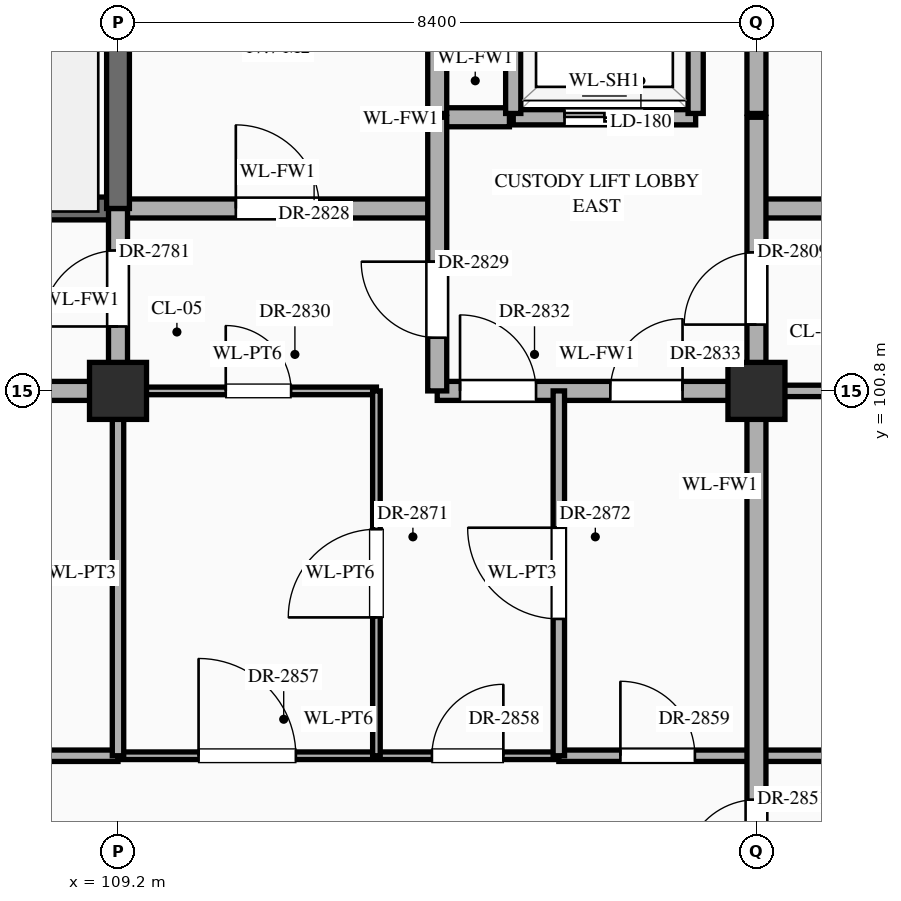
"""IFC4 building model, lengths in metres.
Left out: names, types, materials, properties, quantities, classifications, styles, units other than length and angle.
Written with IfcOpenShell. Run it as: python <this file> out.ifc"""

import sys

from ifc_helpers import new_model, si_unit, direction, frame, frame_2d, origin, origin_2d, place, context, subcontext, project, spatial, rectangle, extrude, element, fill, save


model = new_model("IFC4")
c1 = context("Model", 3, precision=1e-05, world=origin(), true_north=direction((0.0, 1.0)))
c2 = subcontext(c1, "Body", "Model", "MODEL_VIEW")
j1 = project(units=[si_unit("LENGTHUNIT", "METRE"), si_unit("PLANEANGLEUNIT", "RADIAN")], contexts=[c1])
p1 = place(None, origin())
s1 = spatial("IfcSite", under=j1, at=p1, CompositionType="ELEMENT")
p2 = place(p1, origin())
s2 = spatial("IfcBuilding", under=s1, at=p2, CompositionType="ELEMENT")
p3 = place(p2, frame((0.0, 0.0, 43.5)))
s3 = spatial("IfcBuildingStorey", under=s2, at=p3, CompositionType="ELEMENT", Elevation=43.5)
for number, where, z_axis, x_axis in (
    (1, (109.2, 100.8, 0.0), (0.0, 0.0, 1.0), (1.0, 0.0, 0.0)),
    (2, (117.6, 100.8, 0.0), (0.0, 0.0, 1.0), (1.0, 0.0, 0.0)),
):
    element("IfcColumn", number, at=place(p3, frame(where, z_axis=z_axis, x_axis=x_axis)), inside=s3, PredefinedType="COLUMN", context=c2, shape_type="SweptSolid", body=[
        extrude(rectangle(XDim=0.75, YDim=0.75, at=origin_2d()), origin(), (0.0, 0.0, 1.0), 4.2),
    ])
p4 = place(p3, frame((89.8, 96.0, 0.0), z_axis=(0.0, 0.0, 1.0), x_axis=(1.0, 0.0, 0.0)))
e3 = element("IfcWall", 3, at=p4, inside=s3, PredefinedType="STANDARD", context=c2, shape_type="SweptSolid", body=[
    extrude(rectangle(XDim=19.4, YDim=0.15, at=frame_2d((9.7, 0.0))), origin(), (0.0, 0.0, 1.0), 3.95),
])
p5 = place(p4, frame((0.72, 0.0, 0.0)))
e4 = element("IfcOpeningElement", 4, at=p5, cuts=e3, PredefinedType="OPENING", context=c2, shape_type="SweptSolid", body=[
    extrude(rectangle(XDim=1.16, YDim=2.3, at=frame_2d((0.58, 1.15))), frame((0.0, 0.087, 0.0), z_axis=(0.0, -1.0, 0.0), x_axis=(1.0, 0.0, 0.0)), (0.0, 0.0, 1.0), 0.174),
])
p6 = place(p4, frame((6.2, 0.0, 0.0)))
e5 = element("IfcOpeningElement", 5, at=p6, cuts=e3, PredefinedType="OPENING", context=c2, shape_type="SweptSolid", body=[
    extrude(rectangle(XDim=1.2, YDim=2.35, at=frame_2d((0.6, 1.175))), frame((0.0, 0.087, 0.0), z_axis=(0.0, -1.0, 0.0), x_axis=(1.0, 0.0, 0.0)), (0.0, 0.0, 1.0), 0.174),
])
p7 = place(p4, frame((14.58, 0.0, 0.0)))
e6 = element("IfcOpeningElement", 6, at=p7, cuts=e3, PredefinedType="OPENING", context=c2, shape_type="SweptSolid", body=[
    extrude(rectangle(XDim=1.24, YDim=2.3, at=frame_2d((0.62, 1.15))), frame((0.0, 0.087, 0.0), z_axis=(0.0, -1.0, 0.0), x_axis=(1.0, 0.0, 0.0)), (0.0, 0.0, 1.0), 0.174),
])
p8 = place(p3, frame((109.2, 96.0, 0.0), z_axis=(0.0, 0.0, 1.0), x_axis=(1.0, 0.0, 0.0)))
e7 = element("IfcWall", 7, at=p8, inside=s3, PredefinedType="STANDARD", context=c2, shape_type="SweptSolid", body=[
    extrude(rectangle(XDim=5.8, YDim=0.1, at=frame_2d((2.9, 0.0))), origin(), (0.0, 0.0, 1.0), 3.95),
])
p9 = place(p8, frame((1.06, 0.0, 0.0)))
e8 = element("IfcOpeningElement", 8, at=p9, cuts=e7, PredefinedType="OPENING", context=c2, shape_type="SweptSolid", body=[
    extrude(rectangle(XDim=1.28, YDim=2.35, at=frame_2d((0.64, 1.175))), frame((0.0, 0.062, 0.0), z_axis=(0.0, -1.0, 0.0), x_axis=(1.0, 0.0, 0.0)), (0.0, 0.0, 1.0), 0.124),
])
p10 = place(p8, frame((4.13, 0.0, 0.0)))
e9 = element("IfcOpeningElement", 9, at=p10, cuts=e7, PredefinedType="OPENING", context=c2, shape_type="SweptSolid", body=[
    extrude(rectangle(XDim=0.94, YDim=2.3, at=frame_2d((0.47, 1.15))), frame((0.0, 0.062, 0.0), z_axis=(0.0, -1.0, 0.0), x_axis=(1.0, 0.0, 0.0)), (0.0, 0.0, 1.0), 0.124),
])
p11 = place(p3, frame((115.0, 96.0, 0.0), z_axis=(0.0, 0.0, 1.0), x_axis=(1.0, 0.0, 0.0)))
e10 = element("IfcWall", 10, at=p11, inside=s3, PredefinedType="STANDARD", context=c2, shape_type="SweptSolid", body=[
    extrude(rectangle(XDim=10.96, YDim=0.15, at=frame_2d((5.48, 0.0))), origin(), (0.0, 0.0, 1.0), 4.0),
])
p12 = place(p11, frame((0.81, 0.0, 0.0)))
e11 = element("IfcOpeningElement", 11, at=p12, cuts=e10, PredefinedType="OPENING", context=c2, shape_type="SweptSolid", body=[
    extrude(rectangle(XDim=0.98, YDim=2.35, at=frame_2d((0.49, 1.175))), frame((0.0, 0.087, 0.0), z_axis=(0.0, -1.0, 0.0), x_axis=(1.0, 0.0, 0.0)), (0.0, 0.0, 1.0), 0.174),
])
p13 = place(p11, frame((6.3, 0.0, 0.0)))
e12 = element("IfcOpeningElement", 12, at=p13, cuts=e10, PredefinedType="OPENING", context=c2, shape_type="SweptSolid", body=[
    extrude(rectangle(XDim=0.96, YDim=2.2, at=frame_2d((0.48, 1.1))), frame((0.0, 0.087, 0.0), z_axis=(0.0, -1.0, 0.0), x_axis=(1.0, 0.0, 0.0)), (0.0, 0.0, 1.0), 0.174),
])
p14 = place(p3, frame((96.6, 100.8, 0.0), z_axis=(0.0, 0.0, 1.0), x_axis=(1.0, 0.0, 0.0)))
e13 = element("IfcWall", 13, at=p14, inside=s3, PredefinedType="STANDARD", context=c2, shape_type="SweptSolid", body=[
    extrude(rectangle(XDim=12.6, YDim=0.25, at=frame_2d((6.3, 0.0))), origin(), (0.0, 0.0, 1.0), 3.1),
])
p15 = place(p14, frame((7.925, 0.0, 0.0)))
e14 = element("IfcOpeningElement", 14, at=p15, cuts=e13, PredefinedType="OPENING", context=c2, shape_type="SweptSolid", body=[
    extrude(rectangle(XDim=0.95, YDim=2.15, at=frame_2d((0.475, 1.075))), frame((0.0, 0.137, 0.0), z_axis=(0.0, -1.0, 0.0), x_axis=(1.0, 0.0, 0.0)), (0.0, 0.0, 1.0), 0.274),
])
p16 = place(p3, frame((109.2, 100.8, 0.0), z_axis=(0.0, 0.0, 1.0), x_axis=(1.0, 0.0, 0.0)))
e15 = element("IfcWall", 15, at=p16, inside=s3, PredefinedType="STANDARD", context=c2, shape_type="SweptSolid", body=[
    extrude(rectangle(XDim=3.4, YDim=0.1, at=frame_2d((1.7, 0.0))), origin(), (0.0, 0.0, 1.0), 3.1),
])
p17 = place(p16, frame((1.417, 0.0, 0.0)))
e16 = element("IfcOpeningElement", 16, at=p17, cuts=e15, PredefinedType="OPENING", context=c2, shape_type="SweptSolid", body=[
    extrude(rectangle(XDim=0.86, YDim=2.1, at=frame_2d((0.43, 1.05))), frame((0.0, 0.062, 0.0), z_axis=(0.0, -1.0, 0.0), x_axis=(1.0, 0.0, 0.0)), (0.0, 0.0, 1.0), 0.124),
])
p18 = place(p3, frame((113.4, 100.8, 0.0), z_axis=(0.0, 0.0, 1.0), x_axis=(1.0, 0.0, 0.0)))
e17 = element("IfcWall", 17, at=p18, inside=s3, PredefinedType="STANDARD", context=c2, shape_type="SweptSolid", body=[
    extrude(rectangle(XDim=4.2, YDim=0.25, at=frame_2d((2.1, 0.0))), origin(), (0.0, 0.0, 1.0), 3.1),
])
p19 = place(p18, frame((0.3, 0.0, 0.0)))
e18 = element("IfcOpeningElement", 18, at=p19, cuts=e17, PredefinedType="OPENING", context=c2, shape_type="SweptSolid", body=[
    extrude(rectangle(XDim=1.0, YDim=2.2, at=frame_2d((0.5, 1.1))), frame((0.0, 0.137, 0.0), z_axis=(0.0, -1.0, 0.0), x_axis=(1.0, 0.0, 0.0)), (0.0, 0.0, 1.0), 0.274),
])
p20 = place(p18, frame((2.278, 0.0, 0.0)))
e19 = element("IfcOpeningElement", 19, at=p20, cuts=e17, PredefinedType="OPENING", context=c2, shape_type="SweptSolid", body=[
    extrude(rectangle(XDim=0.95, YDim=2.15, at=frame_2d((0.475, 1.075))), frame((0.0, 0.137, 0.0), z_axis=(0.0, -1.0, 0.0), x_axis=(1.0, 0.0, 0.0)), (0.0, 0.0, 1.0), 0.274),
])
p21 = place(p3, frame((117.6, 100.8, 0.0), z_axis=(0.0, 0.0, 1.0), x_axis=(1.0, 0.0, 0.0)))
e20 = element("IfcWall", 20, at=p21, inside=s3, PredefinedType="STANDARD", context=c2, shape_type="SweptSolid", body=[
    extrude(rectangle(XDim=4.2, YDim=0.15, at=frame_2d((2.1, 0.0))), origin(), (0.0, 0.0, 1.0), 3.15),
])
p22 = place(p21, frame((1.718, 0.0, 0.0)))
e21 = element("IfcOpeningElement", 21, at=p22, cuts=e20, PredefinedType="OPENING", context=c2, shape_type="SweptSolid", body=[
    extrude(rectangle(XDim=1.06, YDim=2.4, at=frame_2d((0.53, 1.2))), frame((0.0, 0.087, 0.0), z_axis=(0.0, -1.0, 0.0), x_axis=(1.0, 0.0, 0.0)), (0.0, 0.0, 1.0), 0.174),
])
p23 = place(p3, frame((100.8, 103.2, 0.0), z_axis=(0.0, 0.0, 1.0), x_axis=(1.0, 0.0, 0.0)))
e22 = element("IfcWall", 22, at=p23, inside=s3, PredefinedType="SHEAR", context=c2, shape_type="SweptSolid", body=[
    extrude(rectangle(XDim=8.4, YDim=0.3, at=frame_2d((4.2, 0.0))), origin(), (0.0, 0.0, 1.0), 3.95),
])
p24 = place(p23, frame((0.65, 0.0, 0.0)))
e23 = element("IfcOpeningElement", 23, at=p24, cuts=e22, PredefinedType="OPENING", context=c2, shape_type="SweptSolid", body=[
    extrude(rectangle(XDim=1.1, YDim=2.2, at=frame_2d((0.55, 1.1))), frame((0.0, 0.162, 0.0), z_axis=(0.0, -1.0, 0.0), x_axis=(1.0, 0.0, 0.0)), (0.0, 0.0, 1.0), 0.324),
])
p25 = place(p3, frame((109.2, 103.2, 0.0), z_axis=(0.0, 0.0, 1.0), x_axis=(1.0, 0.0, 0.0)))
e24 = element("IfcWall", 24, at=p25, inside=s3, PredefinedType="STANDARD", context=c2, shape_type="SweptSolid", body=[
    extrude(rectangle(XDim=4.2, YDim=0.25, at=frame_2d((2.1, 0.0))), origin(), (0.0, 0.0, 1.0), 3.95),
])
p26 = place(p25, frame((1.55, 0.0, 0.0)))
e25 = element("IfcOpeningElement", 25, at=p26, cuts=e24, PredefinedType="OPENING", context=c2, shape_type="SweptSolid", body=[
    extrude(rectangle(XDim=1.1, YDim=2.2, at=frame_2d((0.55, 1.1))), frame((0.0, 0.137, 0.0), z_axis=(0.0, -1.0, 0.0), x_axis=(1.0, 0.0, 0.0)), (0.0, 0.0, 1.0), 0.274),
])
p27 = place(p3, frame((117.6, 103.2, 0.0), z_axis=(0.0, 0.0, 1.0), x_axis=(1.0, 0.0, 0.0)))
e26 = element("IfcWall", 26, at=p27, inside=s3, PredefinedType="STANDARD", context=c2, shape_type="SweptSolid", body=[
    extrude(rectangle(XDim=4.2, YDim=0.25, at=frame_2d((2.1, 0.0))), origin(), (0.0, 0.0, 1.0), 4.0),
])
p28 = place(p27, frame((1.55, 0.0, 0.0)))
e27 = element("IfcOpeningElement", 27, at=p28, cuts=e26, PredefinedType="OPENING", context=c2, shape_type="SweptSolid", body=[
    extrude(rectangle(XDim=1.1, YDim=2.2, at=frame_2d((0.55, 1.1))), frame((0.0, 0.137, 0.0), z_axis=(0.0, -1.0, 0.0), x_axis=(1.0, 0.0, 0.0)), (0.0, 0.0, 1.0), 0.274),
])
p29 = place(p3, frame((113.45, 104.4, 0.0), z_axis=(0.0, 0.0, 1.0), x_axis=(1.0, 0.0, 0.0)))
e28 = element("IfcWall", 28, at=p29, inside=s3, PredefinedType="STANDARD", context=c2, shape_type="SweptSolid", body=[
    extrude(rectangle(XDim=0.9, YDim=0.25, at=frame_2d((0.45, 0.0))), origin(), (0.0, 0.0, 1.0), 3.95),
])
p30 = place(p3, frame((114.4, 104.4, 0.0), z_axis=(0.0, 0.0, 1.0), x_axis=(1.0, 0.0, 0.0)))
e29 = element("IfcWall", 29, at=p30, inside=s3, PredefinedType="STANDARD", context=c2, shape_type="SweptSolid", body=[
    extrude(rectangle(XDim=2.4, YDim=0.2, at=frame_2d((1.2, 0.0))), origin(), (0.0, 0.0, 1.0), 3.95),
])
p31 = place(p30, frame((0.675, 0.0, 0.0)))
e30 = element("IfcOpeningElement", 30, at=p31, cuts=e29, PredefinedType="OPENING", context=c2, shape_type="SweptSolid", body=[
    extrude(rectangle(XDim=1.05, YDim=2.15, at=frame_2d((0.525, 1.075))), frame((0.0, 0.112, 0.0), z_axis=(0.0, -1.0, 0.0), x_axis=(1.0, 0.0, 0.0)), (0.0, 0.0, 1.0), 0.224),
])
p32 = place(p3, frame((109.2, 96.0, 0.0), z_axis=(0.0, 0.0, 1.0), x_axis=(0.0, 1.0, 0.0)))
e31 = element("IfcWall", 31, at=p32, inside=s3, PredefinedType="STANDARD", context=c2, shape_type="SweptSolid", body=[
    extrude(rectangle(XDim=4.8, YDim=0.15, at=frame_2d((2.4, 0.0))), origin(), (0.0, 0.0, 1.0), 3.2),
])
p33 = place(p3, frame((109.2, 100.8, 0.0), z_axis=(0.0, 0.0, 1.0), x_axis=(0.0, 1.0, 0.0)))
e32 = element("IfcWall", 32, at=p33, inside=s3, PredefinedType="STANDARD", context=c2, shape_type="SweptSolid", body=[
    extrude(rectangle(XDim=2.4, YDim=0.25, at=frame_2d((1.2, 0.0))), origin(), (0.0, 0.0, 1.0), 3.2),
])
p34 = place(p33, frame((0.847, 0.0, 0.0)))
e33 = element("IfcOpeningElement", 33, at=p34, cuts=e32, PredefinedType="OPENING", context=c2, shape_type="SweptSolid", body=[
    extrude(rectangle(XDim=1.0, YDim=2.2, at=frame_2d((0.5, 1.1))), frame((0.0, 0.137, 0.0), z_axis=(0.0, -1.0, 0.0), x_axis=(1.0, 0.0, 0.0)), (0.0, 0.0, 1.0), 0.274),
])
p35 = place(p3, frame((109.2, 103.2, 0.0), z_axis=(0.0, 0.0, 1.0), x_axis=(0.0, 1.0, 0.0)))
e34 = element("IfcWall", 34, at=p35, inside=s3, PredefinedType="SHEAR", context=c2, shape_type="SweptSolid", body=[
    extrude(rectangle(XDim=4.8, YDim=0.3, at=frame_2d((2.4, 0.0))), origin(), (0.0, 0.0, 1.0), 3.95),
])
p36 = place(p3, frame((112.6, 96.0, 0.0), z_axis=(0.0, 0.0, 1.0), x_axis=(0.0, 1.0, 0.0)))
e35 = element("IfcWall", 35, at=p36, inside=s3, PredefinedType="STANDARD", context=c2, shape_type="SweptSolid", body=[
    extrude(rectangle(XDim=4.8, YDim=0.1, at=frame_2d((2.4, 0.0))), origin(), (0.0, 0.0, 1.0), 3.95),
])
p37 = place(p36, frame((1.82, 0.0, 0.0)))
e36 = element("IfcOpeningElement", 36, at=p37, cuts=e35, PredefinedType="OPENING", context=c2, shape_type="SweptSolid", body=[
    extrude(rectangle(XDim=1.16, YDim=2.3, at=frame_2d((0.58, 1.15))), frame((0.0, 0.062, 0.0), z_axis=(0.0, -1.0, 0.0), x_axis=(1.0, 0.0, 0.0)), (0.0, 0.0, 1.0), 0.124),
])
p38 = place(p3, frame((113.4, 100.8, 0.0), z_axis=(0.0, 0.0, 1.0), x_axis=(0.0, 1.0, 0.0)))
e37 = element("IfcWall", 37, at=p38, inside=s3, PredefinedType="STANDARD", context=c2, shape_type="SweptSolid", body=[
    extrude(rectangle(XDim=3.6, YDim=0.25, at=frame_2d((1.8, 0.0))), origin(), (0.0, 0.0, 1.0), 3.95),
])
p39 = place(p38, frame((0.7, 0.0, 0.0)))
e38 = element("IfcOpeningElement", 38, at=p39, cuts=e37, PredefinedType="OPENING", context=c2, shape_type="SweptSolid", body=[
    extrude(rectangle(XDim=1.0, YDim=2.2, at=frame_2d((0.5, 1.1))), frame((0.0, 0.137, 0.0), z_axis=(0.0, -1.0, 0.0), x_axis=(1.0, 0.0, 0.0)), (0.0, 0.0, 1.0), 0.274),
])
p40 = place(p3, frame((113.4, 104.45, 0.0), z_axis=(0.0, 0.0, 1.0), x_axis=(0.0, 1.0, 0.0)))
e39 = element("IfcWall", 39, at=p40, inside=s3, PredefinedType="STANDARD", context=c2, shape_type="SweptSolid", body=[
    extrude(rectangle(XDim=3.5, YDim=0.25, at=frame_2d((1.75, 0.0))), origin(), (0.0, 0.0, 1.0), 3.95),
])
p41 = place(p3, frame((114.4, 104.45, 0.0), z_axis=(0.0, 0.0, 1.0), x_axis=(0.0, 1.0, 0.0)))
e40 = element("IfcWall", 40, at=p41, inside=s3, PredefinedType="STANDARD", context=c2, shape_type="SweptSolid", body=[
    extrude(rectangle(XDim=2.3, YDim=0.2, at=frame_2d((1.15, 0.0))), origin(), (0.0, 0.0, 1.0), 3.95),
])
p42 = place(p3, frame((115.0, 96.0, 0.0), z_axis=(0.0, 0.0, 1.0), x_axis=(0.0, 1.0, 0.0)))
e41 = element("IfcWall", 41, at=p42, inside=s3, PredefinedType="STANDARD", context=c2, shape_type="SweptSolid", body=[
    extrude(rectangle(XDim=4.8, YDim=0.15, at=frame_2d((2.4, 0.0))), origin(), (0.0, 0.0, 1.0), 3.95),
])
p43 = place(p42, frame((1.8, 0.0, 0.0)))
e42 = element("IfcOpeningElement", 42, at=p43, cuts=e41, PredefinedType="OPENING", context=c2, shape_type="SweptSolid", body=[
    extrude(rectangle(XDim=1.2, YDim=2.35, at=frame_2d((0.6, 1.175))), frame((0.0, 0.087, 0.0), z_axis=(0.0, -1.0, 0.0), x_axis=(1.0, 0.0, 0.0)), (0.0, 0.0, 1.0), 0.174),
])
p44 = place(p3, frame((116.8, 104.45, 0.0), z_axis=(0.0, 0.0, 1.0), x_axis=(0.0, 1.0, 0.0)))
e43 = element("IfcWall", 43, at=p44, inside=s3, PredefinedType="STANDARD", context=c2, shape_type="SweptSolid", body=[
    extrude(rectangle(XDim=2.3, YDim=0.2, at=frame_2d((1.15, 0.0))), origin(), (0.0, 0.0, 1.0), 3.95),
])
p45 = place(p3, frame((117.6, 91.2, 0.0), z_axis=(0.0, 0.0, 1.0), x_axis=(0.0, 1.0, 0.0)))
e44 = element("IfcWall", 44, at=p45, inside=s3, PredefinedType="STANDARD", context=c2, shape_type="SweptSolid", body=[
    extrude(rectangle(XDim=13.2, YDim=0.25, at=frame_2d((6.6, 0.0))), origin(), (0.0, 0.0, 1.0), 3.2),
])
p46 = place(p45, frame((0.502, 0.0, 0.0)))
e45 = element("IfcOpeningElement", 45, at=p46, cuts=e44, PredefinedType="OPENING", context=c2, shape_type="SweptSolid", body=[
    extrude(rectangle(XDim=1.1, YDim=2.2, at=frame_2d((0.55, 1.1))), frame((0.0, 0.137, 0.0), z_axis=(0.0, -1.0, 0.0), x_axis=(1.0, 0.0, 0.0)), (0.0, 0.0, 1.0), 0.274),
])
p47 = place(p45, frame((10.472, 0.0, 0.0)))
e46 = element("IfcOpeningElement", 46, at=p47, cuts=e44, PredefinedType="OPENING", context=c2, shape_type="SweptSolid", body=[
    extrude(rectangle(XDim=0.95, YDim=2.15, at=frame_2d((0.475, 1.075))), frame((0.0, 0.137, 0.0), z_axis=(0.0, -1.0, 0.0), x_axis=(1.0, 0.0, 0.0)), (0.0, 0.0, 1.0), 0.274),
])
p48 = place(p45, frame((3.272, 0.0, 0.0)))
e47 = element("IfcOpeningElement", 47, at=p48, cuts=e44, PredefinedType="OPENING", context=c2, shape_type="SweptSolid", body=[
    extrude(rectangle(XDim=0.95, YDim=2.15, at=frame_2d((0.475, 1.075))), frame((0.0, 0.137, 0.0), z_axis=(0.0, -1.0, 0.0), x_axis=(1.0, 0.0, 0.0)), (0.0, 0.0, 1.0), 0.274),
])
p49 = place(p3, frame((117.6, 104.45, 0.0), z_axis=(0.0, 0.0, 1.0), x_axis=(0.0, 1.0, 0.0)))
e48 = element("IfcWall", 48, at=p49, inside=s3, PredefinedType="STANDARD", context=c2, shape_type="SweptSolid", body=[
    extrude(rectangle(XDim=3.46, YDim=0.25, at=frame_2d((1.73, 0.0))), origin(), (0.0, 0.0, 1.0), 3.2),
])
p50 = place(p31, origin())
e49 = element("IfcDoor", 49, at=p50, inside=s3, OperationType="DOUBLE_DOOR_SLIDING", PredefinedType="DOOR", context=c2, shape_type="SweptSolid", body=[
    extrude(rectangle(XDim=1.05, YDim=2.15, at=frame_2d((0.525, 1.075))), frame((0.0, 0.025, 0.0), z_axis=(0.0, -1.0, 0.0), x_axis=(1.0, 0.0, 0.0)), (0.0, 0.0, 1.0), 0.05),
])
fill(e30, e49)
p51 = place(p34, origin())
e50 = element("IfcDoor", 50, at=p51, inside=s3, OperationType="SINGLE_SWING_LEFT", PredefinedType="DOOR", context=c2, shape_type="SweptSolid", body=[
    extrude(rectangle(XDim=1.0, YDim=2.2, at=frame_2d((0.5, 1.1))), frame((0.0, 0.025, 0.0), z_axis=(0.0, -1.0, 0.0), x_axis=(1.0, 0.0, 0.0)), (0.0, 0.0, 1.0), 0.05),
])
fill(e33, e50)
p52 = place(p47, origin())
e51 = element("IfcDoor", 51, at=p52, inside=s3, OperationType="SINGLE_SWING_LEFT", PredefinedType="DOOR", context=c2, shape_type="SweptSolid", body=[
    extrude(rectangle(XDim=0.95, YDim=2.15, at=frame_2d((0.475, 1.075))), frame((0.0, 0.025, 0.0), z_axis=(0.0, -1.0, 0.0), x_axis=(1.0, 0.0, 0.0)), (0.0, 0.0, 1.0), 0.05),
])
fill(e46, e51)
p53 = place(p26, origin())
e52 = element("IfcDoor", 52, at=p53, inside=s3, OperationType="SINGLE_SWING_LEFT", PredefinedType="DOOR", context=c2, shape_type="SweptSolid", body=[
    extrude(rectangle(XDim=1.1, YDim=2.2, at=frame_2d((0.55, 1.1))), frame((0.0, 0.025, 0.0), z_axis=(0.0, -1.0, 0.0), x_axis=(1.0, 0.0, 0.0)), (0.0, 0.0, 1.0), 0.05),
])
fill(e25, e52)
p54 = place(p39, origin())
e53 = element("IfcDoor", 53, at=p54, inside=s3, OperationType="SINGLE_SWING_RIGHT", PredefinedType="DOOR", context=c2, shape_type="SweptSolid", body=[
    extrude(rectangle(XDim=1.0, YDim=2.2, at=frame_2d((0.5, 1.1))), frame((0.0, 0.025, 0.0), z_axis=(0.0, -1.0, 0.0), x_axis=(1.0, 0.0, 0.0)), (0.0, 0.0, 1.0), 0.05),
])
fill(e38, e53)
p55 = place(p17, origin())
e54 = element("IfcDoor", 54, at=p55, inside=s3, OperationType="SINGLE_SWING_LEFT", PredefinedType="DOOR", context=c2, shape_type="SweptSolid", body=[
    extrude(rectangle(XDim=0.86, YDim=2.1, at=frame_2d((0.43, 1.05))), frame((0.0, 0.025, 0.0), z_axis=(0.0, -1.0, 0.0), x_axis=(1.0, 0.0, 0.0)), (0.0, 0.0, 1.0), 0.05),
])
fill(e16, e54)
p56 = place(p19, origin())
e55 = element("IfcDoor", 55, at=p56, inside=s3, OperationType="SINGLE_SWING_LEFT", PredefinedType="DOOR", context=c2, shape_type="SweptSolid", body=[
    extrude(rectangle(XDim=1.0, YDim=2.2, at=frame_2d((0.5, 1.1))), frame((0.0, 0.025, 0.0), z_axis=(0.0, -1.0, 0.0), x_axis=(1.0, 0.0, 0.0)), (0.0, 0.0, 1.0), 0.05),
])
fill(e18, e55)
p57 = place(p20, origin())
e56 = element("IfcDoor", 56, at=p57, inside=s3, OperationType="SINGLE_SWING_RIGHT", PredefinedType="DOOR", context=c2, shape_type="SweptSolid", body=[
    extrude(rectangle(XDim=0.95, YDim=2.15, at=frame_2d((0.475, 1.075))), frame((0.0, 0.025, 0.0), z_axis=(0.0, -1.0, 0.0), x_axis=(1.0, 0.0, 0.0)), (0.0, 0.0, 1.0), 0.05),
])
fill(e19, e56)
p58 = place(p48, origin())
e57 = element("IfcDoor", 57, at=p58, inside=s3, OperationType="SINGLE_SWING_LEFT", PredefinedType="DOOR", context=c2, shape_type="SweptSolid", body=[
    extrude(rectangle(XDim=0.95, YDim=2.15, at=frame_2d((0.475, 1.075))), frame((0.0, 0.025, 0.0), z_axis=(0.0, -1.0, 0.0), x_axis=(1.0, 0.0, 0.0)), (0.0, 0.0, 1.0), 0.05),
])
fill(e47, e57)
p59 = place(p9, origin())
e58 = element("IfcDoor", 58, at=p59, inside=s3, OperationType="SINGLE_SWING_LEFT", PredefinedType="DOOR", context=c2, shape_type="SweptSolid", body=[
    extrude(rectangle(XDim=1.28, YDim=2.35, at=frame_2d((0.64, 1.175))), frame((0.0, 0.025, 0.0), z_axis=(0.0, -1.0, 0.0), x_axis=(1.0, 0.0, 0.0)), (0.0, 0.0, 1.0), 0.05),
])
fill(e8, e58)
p60 = place(p10, origin())
e59 = element("IfcDoor", 59, at=p60, inside=s3, OperationType="SINGLE_SWING_RIGHT", PredefinedType="DOOR", context=c2, shape_type="SweptSolid", body=[
    extrude(rectangle(XDim=0.94, YDim=2.3, at=frame_2d((0.47, 1.15))), frame((0.0, 0.025, 0.0), z_axis=(0.0, -1.0, 0.0), x_axis=(1.0, 0.0, 0.0)), (0.0, 0.0, 1.0), 0.05),
])
fill(e9, e59)
p61 = place(p12, origin())
e60 = element("IfcDoor", 60, at=p61, inside=s3, OperationType="SINGLE_SWING_LEFT", PredefinedType="DOOR", context=c2, shape_type="SweptSolid", body=[
    extrude(rectangle(XDim=0.98, YDim=2.35, at=frame_2d((0.49, 1.175))), frame((0.0, 0.025, 0.0), z_axis=(0.0, -1.0, 0.0), x_axis=(1.0, 0.0, 0.0)), (0.0, 0.0, 1.0), 0.05),
])
fill(e11, e60)
p62 = place(p37, origin())
e61 = element("IfcDoor", 61, at=p62, inside=s3, OperationType="SINGLE_SWING_LEFT", PredefinedType="DOOR", context=c2, shape_type="SweptSolid", body=[
    extrude(rectangle(XDim=1.16, YDim=2.3, at=frame_2d((0.58, 1.15))), frame((0.0, 0.025, 0.0), z_axis=(0.0, -1.0, 0.0), x_axis=(1.0, 0.0, 0.0)), (0.0, 0.0, 1.0), 0.05),
])
fill(e36, e61)
p63 = place(p43, origin())
e62 = element("IfcDoor", 62, at=p63, inside=s3, OperationType="SINGLE_SWING_RIGHT", PredefinedType="DOOR", context=c2, shape_type="SweptSolid", body=[
    extrude(rectangle(XDim=1.2, YDim=2.35, at=frame_2d((0.6, 1.175))), frame((0.0, 0.025, 0.0), z_axis=(0.0, -1.0, 0.0), x_axis=(1.0, 0.0, 0.0)), (0.0, 0.0, 1.0), 0.05),
])
fill(e42, e62)
save(model, sys.argv[1])
